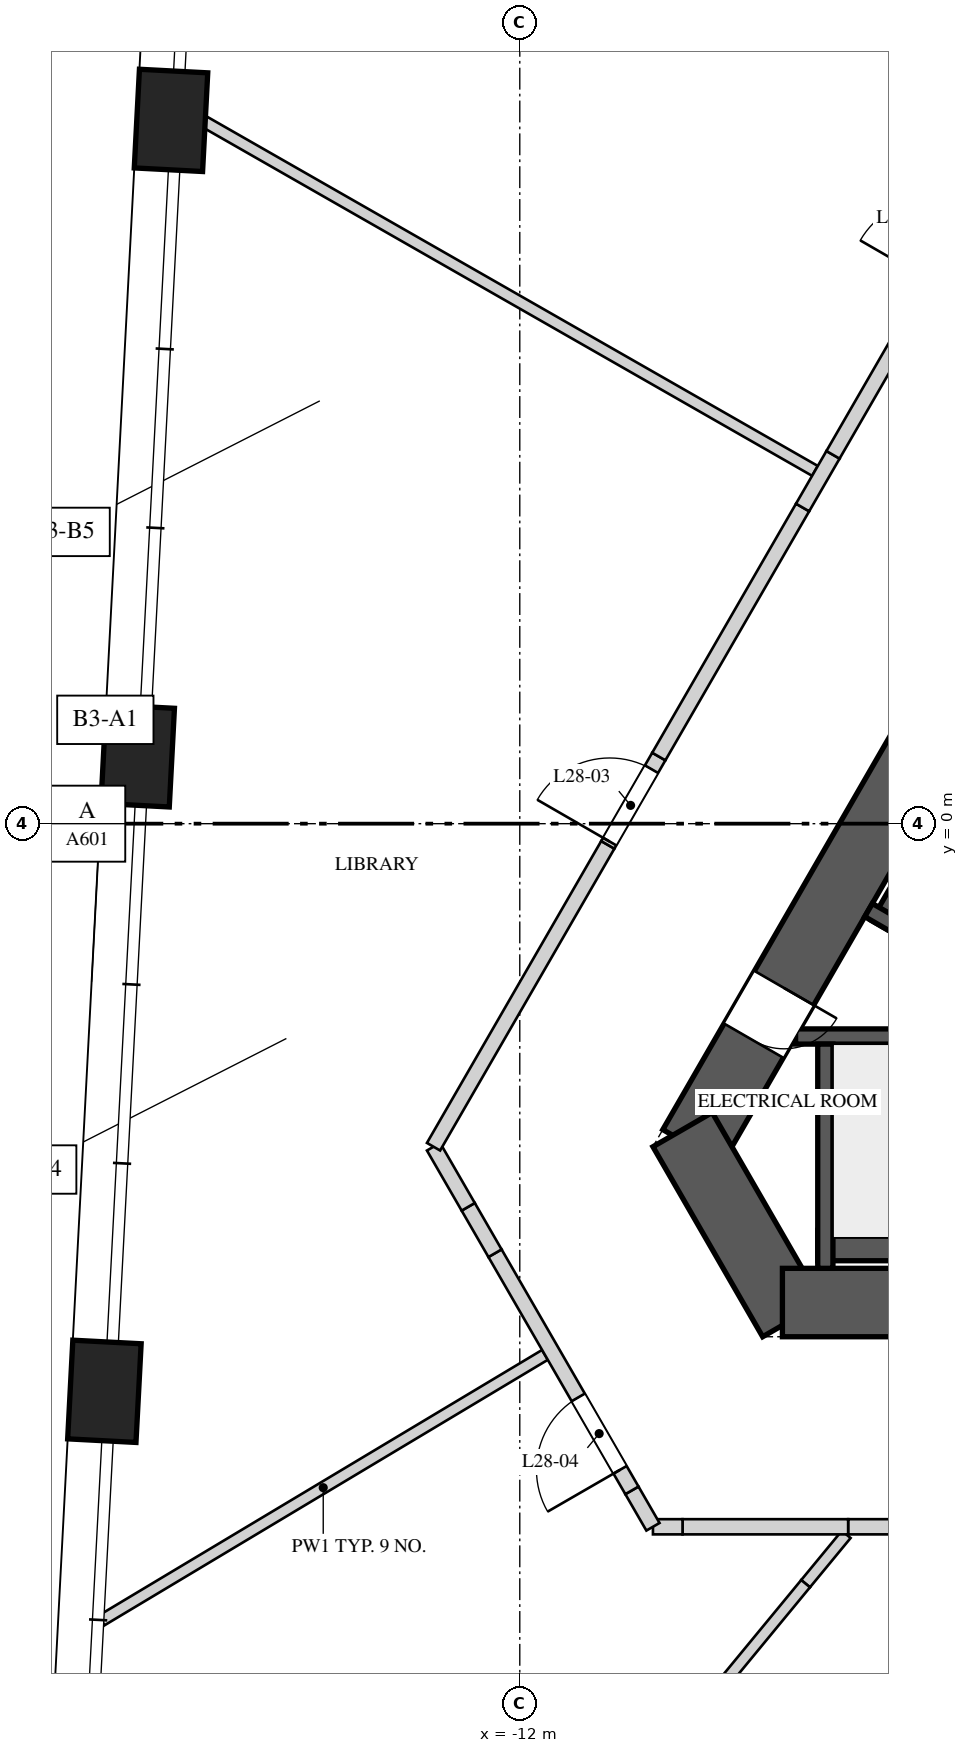
"""IFC4 building model, lengths in metres.
Left out: names, types, materials, properties, quantities, classifications, styles, units other than length and angle.
Written with IfcOpenShell. Run it as: python <this file> out.ifc"""

import sys

from ifc_helpers import new_model, si_unit, direction, frame, frame_2d, origin, origin_2d, place, context, subcontext, project, spatial, polyline, rectangle, outline, extrude, element, fill, save


model = new_model("IFC4")
c1 = context("Model", 3, precision=1e-05, world=origin(), true_north=direction((0.0, 1.0)))
c2 = subcontext(c1, "Body", "Model", "MODEL_VIEW")
j1 = project(units=[si_unit("LENGTHUNIT", "METRE"), si_unit("PLANEANGLEUNIT", "RADIAN")], contexts=[c1])
p1 = place(None, origin())
s1 = spatial("IfcSite", under=j1, at=p1, CompositionType="ELEMENT")
p2 = place(p1, origin())
s2 = spatial("IfcBuilding", under=s1, at=p2, CompositionType="ELEMENT")
p3 = place(p2, frame((0.0, 0.0, 125.6)))
s3 = spatial("IfcBuildingStorey", under=s2, at=p3, CompositionType="ELEMENT", Elevation=125.6)
p4 = place(p3, frame((-1.184, 10.55, 0.0), z_axis=(0.0, 0.0, 1.0), x_axis=(-0.500004814304, -0.866022624227, 0.0)))
e1 = element("IfcWall", 1, at=p4, inside=s3, PredefinedType="SHEAR", context=c2, shape_type="SweptSolid", body=[
    extrude(rectangle(XDim=17.09, YDim=0.9, at=frame_2d((8.545, 0.0))), origin(), (0.0, 0.0, 1.0), 4.0),
])
p5 = place(p4, frame((6.75, 0.0, 0.0)))
e2 = element("IfcOpeningElement", 2, at=p5, cuts=e1, PredefinedType="OPENING", context=c2, shape_type="SweptSolid", body=[
    extrude(rectangle(XDim=1.0, YDim=2.4, at=frame_2d((0.5, 1.2))), frame((0.0, 0.46, 0.0), z_axis=(0.0, -1.0, 0.0), x_axis=(1.0, 0.0, 0.0)), (0.0, 0.0, 1.0), 0.92),
])
p6 = place(p4, frame((14.678, 0.0, 0.0)))
e3 = element("IfcOpeningElement", 3, at=p6, cuts=e1, PredefinedType="OPENING", context=c2, shape_type="SweptSolid", body=[
    extrude(rectangle(XDim=0.8, YDim=2.1, at=frame_2d((0.4, 1.05))), frame((0.0, 0.46, 0.0), z_axis=(0.0, -1.0, 0.0), x_axis=(1.0, 0.0, 0.0)), (0.0, 0.0, 1.0), 0.92),
])
p7 = place(p3, frame((-9.858, -4.025, 0.0), z_axis=(0.0, 0.0, 1.0), x_axis=(0.500059191753, -0.865991226713, 0.0)))
e4 = element("IfcWall", 4, at=p7, inside=s3, PredefinedType="SHEAR", context=c2, shape_type="SweptSolid", body=[
    extrude(rectangle(XDim=2.887, YDim=0.9, at=frame_2d((1.443, 0.0))), origin(), (0.0, 0.0, 1.0), 4.0),
])
p8 = place(p3, frame((-8.545, -6.3, 0.0), z_axis=(0.0, 0.0, 1.0), x_axis=(1.0, 0.0, 0.0)))
e5 = element("IfcWall", 5, at=p8, inside=s3, PredefinedType="SHEAR", context=c2, shape_type="SweptSolid", body=[
    extrude(rectangle(XDim=17.09, YDim=0.9, at=frame_2d((8.545, 0.0))), origin(), (0.0, 0.0, 1.0), 4.0),
])
p9 = place(p8, frame((6.75, 0.0, 0.0)))
e6 = element("IfcOpeningElement", 6, at=p9, cuts=e5, PredefinedType="OPENING", context=c2, shape_type="SweptSolid", body=[
    extrude(rectangle(XDim=1.0, YDim=2.4, at=frame_2d((0.5, 1.2))), frame((0.0, 0.46, 0.0), z_axis=(0.0, -1.0, 0.0), x_axis=(1.0, 0.0, 0.0)), (0.0, 0.0, 1.0), 0.92),
])
p10 = place(p8, frame((14.678, 0.0, 0.0)))
e7 = element("IfcOpeningElement", 7, at=p10, cuts=e5, PredefinedType="OPENING", context=c2, shape_type="SweptSolid", body=[
    extrude(rectangle(XDim=0.8, YDim=2.1, at=frame_2d((0.4, 1.05))), frame((0.0, 0.46, 0.0), z_axis=(0.0, -1.0, 0.0), x_axis=(1.0, 0.0, 0.0)), (0.0, 0.0, 1.0), 0.92),
])
for number, where, z_axis, x_axis in (
    (8, (-16.588, 9.252, -0.35), (0.0, 0.0, 1.0), (-0.052, -0.999, 0.0)),
    (9, (-17.027, 0.892, -0.35), (0.0, 0.0, 1.0), (-0.052, -0.999, 0.0)),
    (10, (-17.465, -7.468, -0.35), (0.0, 0.0, 1.0), (-0.052, -0.999, 0.0)),
):
    element("IfcColumn", number, at=place(p3, frame(where, z_axis=z_axis, x_axis=x_axis)), inside=s3, PredefinedType="COLUMN", context=c2, shape_type="SweptSolid", body=[
        extrude(rectangle(XDim=1.3, YDim=0.9, at=origin_2d()), origin(), (0.0, 0.0, 1.0), 4.35),
    ])
p11 = place(p3, frame((-8.08, -5.55, 0.0), z_axis=(0.0, 0.0, 1.0), x_axis=(1.0, 0.0, 0.0)))
e11 = element("IfcWall", 11, at=p11, inside=s3, PredefinedType="SOLIDWALL", context=c2, shape_type="SweptSolid", body=[
    extrude(rectangle(XDim=6.2, YDim=0.4, at=frame_2d((3.1, 0.0))), origin(), (0.0, 0.0, 1.0), 3.65),
])
p12 = place(p3, frame((-8.372, -2.8, 0.0), z_axis=(0.0, 0.0, 1.0), x_axis=(1.0, 0.0, 0.0)))
e12 = element("IfcWall", 12, at=p12, inside=s3, PredefinedType="SOLIDWALL", context=c2, shape_type="SweptSolid", body=[
    extrude(rectangle(XDim=6.492, YDim=0.2, at=frame_2d((3.246, 0.0))), origin(), (0.0, 0.0, 1.0), 3.65),
])
p13 = place(p3, frame((-7.98, -2.9, 0.0), z_axis=(0.0, 0.0, 1.0), x_axis=(0.0, -1.0, 0.0)))
e13 = element("IfcWall", 13, at=p13, inside=s3, PredefinedType="SOLIDWALL", context=c2, shape_type="SweptSolid", body=[
    extrude(rectangle(XDim=2.95, YDim=0.2, at=frame_2d((1.475, 0.0))), origin(), (0.0, 0.0, 1.0), 3.65),
])
p14 = place(p3, frame((-4.451, 3.39, 0.0), z_axis=(0.0, 0.0, 1.0), x_axis=(-0.499996545922, -0.866027397988, 0.0)))
e14 = element("IfcWall", 14, at=p14, inside=s3, PredefinedType="SOLIDWALL", context=c2, shape_type="SweptSolid", body=[
    extrude(rectangle(XDim=5.5, YDim=0.4, at=frame_2d((2.75, 0.0))), origin(), (0.0, 0.0, 1.0), 3.65),
])
p15 = place(p3, frame((-5.03, -2.512, 0.0), z_axis=(0.0, 0.0, 1.0), x_axis=(-0.866005201286, 0.500034990121, 0.0)))
e15 = element("IfcWall", 15, at=p15, inside=s3, PredefinedType="SOLIDWALL", context=c2, shape_type="SweptSolid", body=[
    extrude(rectangle(XDim=2.75, YDim=0.2, at=frame_2d((1.375, 0.0))), origin(), (0.0, 0.0, 1.0), 3.65),
])
p16 = place(p3, frame((-11.669, -6.989, 0.0), z_axis=(0.0, 0.0, 1.0), x_axis=(-0.857901349598, -0.513814435724, 0.0)))
e16 = element("IfcWall", 16, at=p16, inside=s3, PredefinedType="PARTITIONING", context=c2, shape_type="SweptSolid", body=[
    extrude(rectangle(XDim=6.8, YDim=0.15, at=frame_2d((3.4, 0.0))), origin(), (0.0, 0.0, 1.0), 3.65),
])
p17 = place(p3, frame((-8.117, 4.641, 0.0), z_axis=(0.0, 0.0, 1.0), x_axis=(-0.868089906789, 0.496407004111, 0.0)))
e17 = element("IfcWall", 17, at=p17, inside=s3, PredefinedType="PARTITIONING", context=c2, shape_type="SweptSolid", body=[
    extrude(rectangle(XDim=9.611, YDim=0.15, at=frame_2d((4.806, 0.0))), origin(), (0.0, 0.0, 1.0), 2.75),
])
p18 = place(p3, frame((-7.705, -9.35, 0.0), z_axis=(0.0, 0.0, 1.0), x_axis=(-0.636002543614, -0.771686960183, 0.0)))
e18 = element("IfcWall", 18, at=p18, inside=s3, PredefinedType="PARTITIONING", context=c2, shape_type="SweptSolid", body=[
    extrude(rectangle(XDim=0.84, YDim=0.15, at=frame_2d((0.42, 0.0))), origin(), (0.0, 0.0, 1.0), 2.55),
])
p19 = place(p3, frame((-8.24, -9.999, 0.0), z_axis=(0.0, 0.0, 1.0), x_axis=(-0.635985012828, -0.771701408226, 0.0)))
e19 = element("IfcWall", 19, at=p19, inside=s3, PredefinedType="PARTITIONING", context=c2, shape_type="SweptSolid", body=[
    extrude(rectangle(XDim=11.675, YDim=0.15, at=frame_2d((5.837, 0.0))), origin(), (0.0, 0.0, 1.0), 3.65),
])
p20 = place(p3, frame((-3.9, -9.35, 0.0), z_axis=(0.0, 0.0, 1.0), x_axis=(-0.384954205796, -0.922935674595, 0.0)))
e20 = element("IfcWall", 20, at=p20, inside=s3, PredefinedType="PARTITIONING", context=c2, shape_type="SweptSolid", body=[
    extrude(rectangle(XDim=16.013, YDim=0.15, at=frame_2d((8.007, 0.0))), origin(), (0.0, 0.0, 1.0), 3.65),
])
p21 = place(p3, frame((-6.545, -9.25, 0.0), z_axis=(0.0, 0.0, 1.0), x_axis=(-1.0, 0.0, 0.0)))
e21 = element("IfcWall", 21, at=p21, inside=s3, PredefinedType="SOLIDWALL", context=c2, shape_type="SweptSolid", body=[
    extrude(rectangle(XDim=1.135, YDim=0.2, at=frame_2d((0.568, 0.0))), origin(), (0.0, 0.0, 1.0), 2.55),
])
p22 = place(p3, frame((-7.68, -9.25, 0.0), z_axis=(0.0, 0.0, 1.0), x_axis=(-1.0, 0.0, 0.0)))
e22 = element("IfcWall", 22, at=p22, inside=s3, PredefinedType="SOLIDWALL", context=c2, shape_type="SweptSolid", body=[
    extrude(rectangle(XDim=2.179, YDim=0.2, at=frame_2d((1.089, 0.0))), origin(), (0.0, 0.0, 1.0), 3.65),
])
p23 = place(p3, frame((-9.859, -9.25, 0.0), z_axis=(0.0, 0.0, 1.0), x_axis=(-1.0, 0.0, 0.0)))
e23 = element("IfcWall", 23, at=p23, inside=s3, PredefinedType="SOLIDWALL", context=c2, shape_type="SweptSolid", body=[
    extrude(rectangle(XDim=0.389, YDim=0.2, at=frame_2d((0.195, 0.0))), origin(), (0.0, 0.0, 1.0), 2.75),
])
p24 = place(p3, frame((-10.248, -9.25, 0.0), z_axis=(0.0, 0.0, 1.0), x_axis=(-0.499887958344, 0.866090081402, 0.0)))
e24 = element("IfcWall", 24, at=p24, inside=s3, PredefinedType="SOLIDWALL", context=c2, shape_type="SweptSolid", body=[
    extrude(rectangle(XDim=0.553, YDim=0.2, at=frame_2d((0.277, 0.0))), origin(), (0.0, 0.0, 1.0), 2.75),
])
p25 = place(p3, frame((-10.525, -8.771, 0.0), z_axis=(0.0, 0.0, 1.0), x_axis=(-0.500031425827, 0.866007259314, 0.0)))
e25 = element("IfcWall", 25, at=p25, inside=s3, PredefinedType="SOLIDWALL", context=c2, shape_type="SweptSolid", body=[
    extrude(rectangle(XDim=3.602, YDim=0.2, at=frame_2d((1.801, 0.0))), origin(), (0.0, 0.0, 1.0), 3.65),
])
p26 = place(p25, frame((0.312, 0.0, 0.0)))
e26 = element("IfcOpeningElement", 26, at=p26, cuts=e25, PredefinedType="OPENING", context=c2, shape_type="SweptSolid", body=[
    extrude(rectangle(XDim=1.1, YDim=2.4, at=frame_2d((0.55, 1.2))), frame((0.0, 0.11, 0.0), z_axis=(0.0, -1.0, 0.0), x_axis=(1.0, 0.0, 0.0)), (0.0, 0.0, 1.0), 0.22),
])
p27 = place(p3, frame((-12.326, -5.651, 0.0), z_axis=(0.0, 0.0, 1.0), x_axis=(-0.499752435038, 0.86616828831, 0.0)))
e27 = element("IfcWall", 27, at=p27, inside=s3, PredefinedType="SOLIDWALL", context=c2, shape_type="SweptSolid", body=[
    extrude(rectangle(XDim=0.705, YDim=0.2, at=frame_2d((0.353, 0.0))), origin(), (0.0, 0.0, 1.0), 2.95),
])
p28 = place(p3, frame((-12.678, -5.041, 0.0), z_axis=(0.0, 0.0, 1.0), x_axis=(-0.500108273885, 0.865962882802, 0.0)))
e28 = element("IfcWall", 28, at=p28, inside=s3, PredefinedType="SOLIDWALL", context=c2, shape_type="SweptSolid", body=[
    extrude(rectangle(XDim=0.913, YDim=0.2, at=frame_2d((0.457, 0.0))), origin(), (0.0, 0.0, 1.0), 3.65),
])
p29 = place(p3, frame((-13.135, -4.25, 0.0), z_axis=(0.0, 0.0, 1.0), x_axis=(0.499992833172, 0.866029541515, 0.0)))
e29 = element("IfcWall", 29, at=p29, inside=s3, PredefinedType="SOLIDWALL", context=c2, shape_type="SweptSolid", body=[
    extrude(rectangle(XDim=4.585, YDim=0.2, at=frame_2d((2.293, 0.0))), origin(), (0.0, 0.0, 1.0), 3.65),
])
p30 = place(p3, frame((-10.842, -0.279, 0.0), z_axis=(0.0, 0.0, 1.0), x_axis=(0.500032109083, 0.866006864803, 0.0)))
e30 = element("IfcWall", 30, at=p30, inside=s3, PredefinedType="SOLIDWALL", context=c2, shape_type="SweptSolid", body=[
    extrude(outline(polyline([(0.0, 0.0), (1.342, 0.0), (1.342, 2.95), (0.557, 2.95), (0.557, 3.65), (0.0, 3.65), (0.0, 0.0)])), frame((0.0, 0.1, 0.0), z_axis=(0.0, -1.0, 0.0), x_axis=(1.0, 0.0, 0.0)), (0.0, 0.0, 1.0), 0.2),
])
p31 = place(p30, frame((0.05, 0.0, 0.0)))
e31 = element("IfcOpeningElement", 31, at=p31, cuts=e30, PredefinedType="OPENING", context=c2, shape_type="SweptSolid", body=[
    extrude(rectangle(XDim=1.1, YDim=2.4, at=frame_2d((0.55, 1.2))), frame((0.0, 0.11, 0.0), z_axis=(0.0, -1.0, 0.0), x_axis=(1.0, 0.0, 0.0)), (0.0, 0.0, 1.0), 0.22),
])
p32 = place(p3, frame((-10.171, 0.884, 0.0), z_axis=(0.0, 0.0, 1.0), x_axis=(0.499998034377, 0.866026538634, 0.0)))
e32 = element("IfcWall", 32, at=p32, inside=s3, PredefinedType="SOLIDWALL", context=c2, shape_type="SweptSolid", body=[
    extrude(rectangle(XDim=3.783, YDim=0.2, at=frame_2d((1.892, 0.0))), origin(), (0.0, 0.0, 1.0), 3.65),
])
p33 = place(p3, frame((-8.279, 4.16, 0.0), z_axis=(0.0, 0.0, 1.0), x_axis=(0.500109828528, 0.865961984968, 0.0)))
e33 = element("IfcWall", 33, at=p33, inside=s3, PredefinedType="SOLIDWALL", context=c2, shape_type="SweptSolid", body=[
    extrude(rectangle(XDim=0.8, YDim=0.2, at=frame_2d((0.4, 0.0))), origin(), (0.0, 0.0, 1.0), 2.75),
])
p34 = place(p3, frame((-7.879, 4.853, 0.0), z_axis=(0.0, 0.0, 1.0), x_axis=(0.499948868167, 0.866054922749, 0.0)))
e34 = element("IfcWall", 34, at=p34, inside=s3, PredefinedType="SOLIDWALL", context=c2, shape_type="SweptSolid", body=[
    extrude(rectangle(XDim=2.178, YDim=0.2, at=frame_2d((1.089, 0.0))), origin(), (0.0, 0.0, 1.0), 3.65),
])
p35 = place(p6, origin())
e35 = element("IfcDoor", 35, at=p35, inside=s3, OperationType="SINGLE_SWING_LEFT", PredefinedType="DOOR", context=c2, shape_type="SweptSolid", body=[
    extrude(rectangle(XDim=0.8, YDim=2.1, at=frame_2d((0.4, 1.05))), frame((0.0, 0.025, 0.0), z_axis=(0.0, -1.0, 0.0), x_axis=(1.0, 0.0, 0.0)), (0.0, 0.0, 1.0), 0.05),
])
fill(e3, e35)
p36 = place(p31, origin())
e36 = element("IfcDoor", 36, at=p36, inside=s3, OperationType="SINGLE_SWING_LEFT", PredefinedType="DOOR", context=c2, shape_type="SweptSolid", body=[
    extrude(rectangle(XDim=1.1, YDim=2.4, at=frame_2d((0.55, 1.2))), frame((0.0, 0.025, 0.0), z_axis=(0.0, -1.0, 0.0), x_axis=(1.0, 0.0, 0.0)), (0.0, 0.0, 1.0), 0.05),
])
fill(e31, e36)
p37 = place(p26, origin())
e37 = element("IfcDoor", 37, at=p37, inside=s3, OperationType="SINGLE_SWING_RIGHT", PredefinedType="DOOR", context=c2, shape_type="SweptSolid", body=[
    extrude(rectangle(XDim=1.1, YDim=2.4, at=frame_2d((0.55, 1.2))), frame((0.0, 0.025, 0.0), z_axis=(0.0, -1.0, 0.0), x_axis=(1.0, 0.0, 0.0)), (0.0, 0.0, 1.0), 0.05),
])
fill(e26, e37)
save(model, sys.argv[1])
